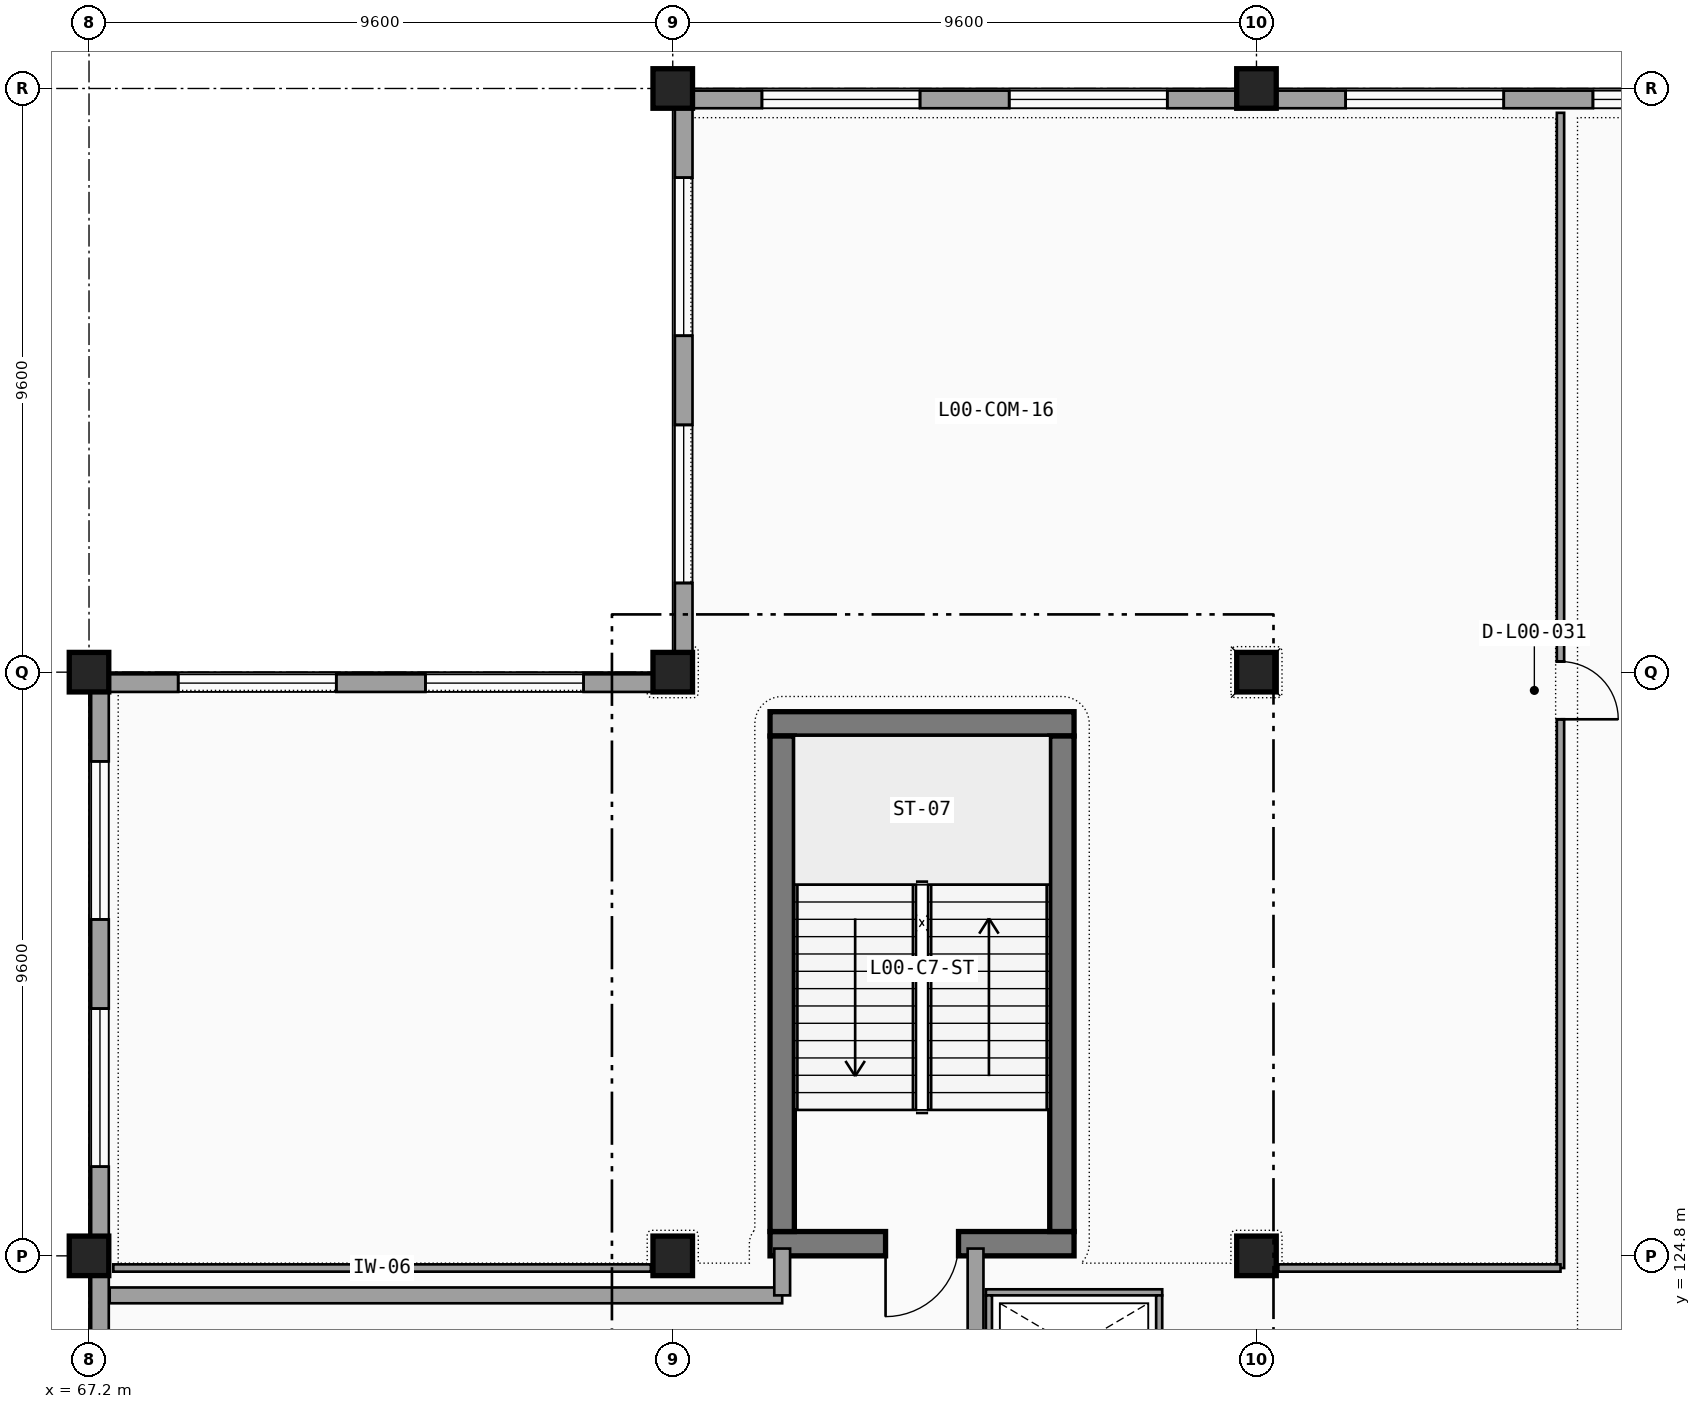
"""IFC4 building model, lengths in metres.
Left out: names, types, materials, properties, quantities, classifications, styles, units other than length and angle.
Written with IfcOpenShell. Run it as: python <this file> out.ifc"""

import sys

from ifc_helpers import new_model, si_unit, direction, frame, frame_2d, origin, origin_2d, place, context, subcontext, project, spatial, rectangle, extrude, element, fill, save


model = new_model("IFC4")
c1 = context("Model", 3, precision=1e-05, world=origin(), true_north=direction((0.0, 1.0)))
c2 = subcontext(c1, "Body", "Model", "MODEL_VIEW")
j1 = project(units=[si_unit("LENGTHUNIT", "METRE"), si_unit("PLANEANGLEUNIT", "RADIAN")], contexts=[c1])
p1 = place(None, origin())
s1 = spatial("IfcSite", under=j1, at=p1, CompositionType="ELEMENT")
p2 = place(p1, origin())
s2 = spatial("IfcBuilding", under=s1, at=p2, CompositionType="ELEMENT")
p3 = place(p2, origin())
s3 = spatial("IfcBuildingStorey", under=s2, at=p3, CompositionType="ELEMENT", Elevation=0.0)
for number, where, z_axis, x_axis in (
    (1, (67.2, 124.8, 0.0), (0.0, 0.0, 1.0), (1.0, 0.0, 0.0)),
    (2, (67.2, 134.4, 0.0), (0.0, 0.0, 1.0), (1.0, 0.0, 0.0)),
    (3, (76.8, 124.8, 0.0), (0.0, 0.0, 1.0), (1.0, 0.0, 0.0)),
    (4, (76.8, 134.4, 0.0), (0.0, 0.0, 1.0), (1.0, 0.0, 0.0)),
    (5, (76.8, 144.0, 0.0), (0.0, 0.0, 1.0), (1.0, 0.0, 0.0)),
    (6, (86.4, 124.8, 0.0), (0.0, 0.0, 1.0), (1.0, 0.0, 0.0)),
    (7, (86.4, 134.4, 0.0), (0.0, 0.0, 1.0), (1.0, 0.0, 0.0)),
    (8, (86.4, 144.0, 0.0), (0.0, 0.0, 1.0), (1.0, 0.0, 0.0)),
):
    element("IfcColumn", number, at=place(p3, frame(where, z_axis=z_axis, x_axis=x_axis)), inside=s3, PredefinedType="COLUMN", context=c2, shape_type="SweptSolid", body=[
        extrude(rectangle(XDim=0.65, YDim=0.65, at=origin_2d()), origin(), (0.0, 0.0, 1.0), 4.8),
    ])
p4 = place(p3, frame((96.0, 143.82, 0.0), z_axis=(0.0, 0.0, 1.0), x_axis=(-1.0, 0.0, 0.0)))
e9 = element("IfcWall", 9, at=p4, inside=s3, PredefinedType="SOLIDWALL", context=c2, shape_type="SweptSolid", body=[
    extrude(rectangle(XDim=9.6, YDim=0.29, at=frame_2d((4.8, 0.0))), origin(), (0.0, 0.0, 1.0), 3.573),
])
p5 = place(p4, frame((4.067, 0.0, 1.0), z_axis=(0.0, 0.0, 1.0), x_axis=(-1.0, 0.0, 0.0)))
e10 = element("IfcOpeningElement", 10, at=p5, cuts=e9, PredefinedType="OPENING", context=c2, shape_type="SweptSolid", body=[
    extrude(rectangle(XDim=2.6, YDim=2.0, at=frame_2d((1.3, 1.0))), frame((0.0, 0.155, 0.0), z_axis=(0.0, -1.0, 0.0), x_axis=(1.0, 0.0, 0.0)), (0.0, 0.0, 1.0), 0.31),
])
p6 = place(p4, frame((8.133, 0.0, 1.0), z_axis=(0.0, 0.0, 1.0), x_axis=(-1.0, 0.0, 0.0)))
e11 = element("IfcOpeningElement", 11, at=p6, cuts=e9, PredefinedType="OPENING", context=c2, shape_type="SweptSolid", body=[
    extrude(rectangle(XDim=2.6, YDim=2.0, at=frame_2d((1.3, 1.0))), frame((0.0, 0.155, 0.0), z_axis=(0.0, -1.0, 0.0), x_axis=(1.0, 0.0, 0.0)), (0.0, 0.0, 1.0), 0.31),
])
p7 = place(p3, frame((86.4, 143.82, 0.0), z_axis=(0.0, 0.0, 1.0), x_axis=(-1.0, 0.0, 0.0)))
e12 = element("IfcWall", 12, at=p7, inside=s3, PredefinedType="SOLIDWALL", context=c2, shape_type="SweptSolid", body=[
    extrude(rectangle(XDim=9.6, YDim=0.29, at=frame_2d((4.8, 0.0))), origin(), (0.0, 0.0, 1.0), 3.573),
])
p8 = place(p7, frame((4.067, 0.0, 1.0), z_axis=(0.0, 0.0, 1.0), x_axis=(-1.0, 0.0, 0.0)))
e13 = element("IfcOpeningElement", 13, at=p8, cuts=e12, PredefinedType="OPENING", context=c2, shape_type="SweptSolid", body=[
    extrude(rectangle(XDim=2.6, YDim=2.0, at=frame_2d((1.3, 1.0))), frame((0.0, 0.155, 0.0), z_axis=(0.0, -1.0, 0.0), x_axis=(1.0, 0.0, 0.0)), (0.0, 0.0, 1.0), 0.31),
])
p9 = place(p7, frame((8.133, 0.0, 1.0), z_axis=(0.0, 0.0, 1.0), x_axis=(-1.0, 0.0, 0.0)))
e14 = element("IfcOpeningElement", 14, at=p9, cuts=e12, PredefinedType="OPENING", context=c2, shape_type="SweptSolid", body=[
    extrude(rectangle(XDim=2.6, YDim=2.0, at=frame_2d((1.3, 1.0))), frame((0.0, 0.155, 0.0), z_axis=(0.0, -1.0, 0.0), x_axis=(1.0, 0.0, 0.0)), (0.0, 0.0, 1.0), 0.31),
])
p10 = place(p3, frame((76.98, 144.0, 0.0), z_axis=(0.0, 0.0, 1.0), x_axis=(0.0, -1.0, 0.0)))
e15 = element("IfcWall", 15, at=p10, inside=s3, PredefinedType="SOLIDWALL", context=c2, shape_type="SweptSolid", body=[
    extrude(rectangle(XDim=9.6, YDim=0.29, at=frame_2d((4.8, 0.0))), origin(), (0.0, 0.0, 1.0), 3.7),
])
p11 = place(p10, frame((4.067, 0.0, 1.0), z_axis=(0.0, 0.0, 1.0), x_axis=(-1.0, 0.0, 0.0)))
e16 = element("IfcOpeningElement", 16, at=p11, cuts=e15, PredefinedType="OPENING", context=c2, shape_type="SweptSolid", body=[
    extrude(rectangle(XDim=2.6, YDim=2.0, at=frame_2d((1.3, 1.0))), frame((0.0, 0.155, 0.0), z_axis=(0.0, -1.0, 0.0), x_axis=(1.0, 0.0, 0.0)), (0.0, 0.0, 1.0), 0.31),
])
p12 = place(p10, frame((8.133, 0.0, 1.0), z_axis=(0.0, 0.0, 1.0), x_axis=(-1.0, 0.0, 0.0)))
e17 = element("IfcOpeningElement", 17, at=p12, cuts=e15, PredefinedType="OPENING", context=c2, shape_type="SweptSolid", body=[
    extrude(rectangle(XDim=2.6, YDim=2.0, at=frame_2d((1.3, 1.0))), frame((0.0, 0.155, 0.0), z_axis=(0.0, -1.0, 0.0), x_axis=(1.0, 0.0, 0.0)), (0.0, 0.0, 1.0), 0.31),
])
p13 = place(p3, frame((76.8, 134.22, 0.0), z_axis=(0.0, 0.0, 1.0), x_axis=(-1.0, 0.0, 0.0)))
e18 = element("IfcWall", 18, at=p13, inside=s3, PredefinedType="SOLIDWALL", context=c2, shape_type="SweptSolid", body=[
    extrude(rectangle(XDim=9.6, YDim=0.29, at=frame_2d((4.8, 0.0))), origin(), (0.0, 0.0, 1.0), 3.664),
])
p14 = place(p13, frame((4.067, 0.0, 1.0), z_axis=(0.0, 0.0, 1.0), x_axis=(-1.0, 0.0, 0.0)))
e19 = element("IfcOpeningElement", 19, at=p14, cuts=e18, PredefinedType="OPENING", context=c2, shape_type="SweptSolid", body=[
    extrude(rectangle(XDim=2.6, YDim=2.0, at=frame_2d((1.3, 1.0))), frame((0.0, 0.155, 0.0), z_axis=(0.0, -1.0, 0.0), x_axis=(1.0, 0.0, 0.0)), (0.0, 0.0, 1.0), 0.31),
])
p15 = place(p13, frame((8.133, 0.0, 1.0), z_axis=(0.0, 0.0, 1.0), x_axis=(-1.0, 0.0, 0.0)))
e20 = element("IfcOpeningElement", 20, at=p15, cuts=e18, PredefinedType="OPENING", context=c2, shape_type="SweptSolid", body=[
    extrude(rectangle(XDim=2.6, YDim=2.0, at=frame_2d((1.3, 1.0))), frame((0.0, 0.155, 0.0), z_axis=(0.0, -1.0, 0.0), x_axis=(1.0, 0.0, 0.0)), (0.0, 0.0, 1.0), 0.31),
])
p16 = place(p3, frame((67.38, 134.4, 0.0), z_axis=(0.0, 0.0, 1.0), x_axis=(0.0, -1.0, 0.0)))
e21 = element("IfcWall", 21, at=p16, inside=s3, PredefinedType="SOLIDWALL", context=c2, shape_type="SweptSolid", body=[
    extrude(rectangle(XDim=9.6, YDim=0.29, at=frame_2d((4.8, 0.0))), origin(), (0.0, 0.0, 1.0), 3.7),
])
p17 = place(p16, frame((4.067, 0.0, 1.0), z_axis=(0.0, 0.0, 1.0), x_axis=(-1.0, 0.0, 0.0)))
e22 = element("IfcOpeningElement", 22, at=p17, cuts=e21, PredefinedType="OPENING", context=c2, shape_type="SweptSolid", body=[
    extrude(rectangle(XDim=2.6, YDim=2.0, at=frame_2d((1.3, 1.0))), frame((0.0, 0.155, 0.0), z_axis=(0.0, -1.0, 0.0), x_axis=(1.0, 0.0, 0.0)), (0.0, 0.0, 1.0), 0.31),
])
p18 = place(p16, frame((8.133, 0.0, 1.0), z_axis=(0.0, 0.0, 1.0), x_axis=(-1.0, 0.0, 0.0)))
e23 = element("IfcOpeningElement", 23, at=p18, cuts=e21, PredefinedType="OPENING", context=c2, shape_type="SweptSolid", body=[
    extrude(rectangle(XDim=2.6, YDim=2.0, at=frame_2d((1.3, 1.0))), frame((0.0, 0.155, 0.0), z_axis=(0.0, -1.0, 0.0), x_axis=(1.0, 0.0, 0.0)), (0.0, 0.0, 1.0), 0.31),
])
p19 = place(p3, frame((67.38, 124.8, 0.0), z_axis=(0.0, 0.0, 1.0), x_axis=(0.0, -1.0, 0.0)))
e24 = element("IfcWall", 24, at=p19, inside=s3, PredefinedType="SOLIDWALL", context=c2, shape_type="SweptSolid", body=[
    extrude(rectangle(XDim=9.6, YDim=0.29, at=frame_2d((4.8, 0.0))), origin(), (0.0, 0.0, 1.0), 3.7),
])
p20 = place(p19, frame((3.35, 0.0, 0.0), z_axis=(0.0, 0.0, 1.0), x_axis=(-1.0, 0.0, 0.0)))
e25 = element("IfcOpeningElement", 25, at=p20, cuts=e24, PredefinedType="OPENING", context=c2, shape_type="SweptSolid", body=[
    extrude(rectangle(XDim=2.0, YDim=2.4, at=frame_2d((1.0, 1.2))), frame((0.0, 0.155, 0.0), z_axis=(0.0, -1.0, 0.0), x_axis=(1.0, 0.0, 0.0)), (0.0, 0.0, 1.0), 0.31),
])
p21 = place(p3, frame((78.4, 125.0, 0.0), z_axis=(0.0, 0.0, 1.0), x_axis=(1.0, 0.0, 0.0)))
e26 = element("IfcWall", 26, at=p21, inside=s3, PredefinedType="SHEAR", context=c2, shape_type="SweptSolid", body=[
    extrude(rectangle(XDim=5.0, YDim=0.4, at=frame_2d((2.5, 0.0))), origin(), (0.0, 0.0, 1.0), 4.5),
])
p22 = place(p21, frame((3.1, 0.0, 0.0), z_axis=(0.0, 0.0, 1.0), x_axis=(-1.0, 0.0, 0.0)))
e27 = element("IfcOpeningElement", 27, at=p22, cuts=e26, PredefinedType="OPENING", context=c2, shape_type="SweptSolid", body=[
    extrude(rectangle(XDim=1.2, YDim=2.2, at=frame_2d((0.6, 1.1))), frame((0.0, 0.21, 0.0), z_axis=(0.0, -1.0, 0.0), x_axis=(1.0, 0.0, 0.0)), (0.0, 0.0, 1.0), 0.42),
])
p23 = place(p3, frame((83.4, 133.55, 0.0), z_axis=(0.0, 0.0, 1.0), x_axis=(-1.0, 0.0, 0.0)))
e28 = element("IfcWall", 28, at=p23, inside=s3, PredefinedType="SHEAR", context=c2, shape_type="SweptSolid", body=[
    extrude(rectangle(XDim=5.0, YDim=0.4, at=frame_2d((2.5, 0.0))), origin(), (0.0, 0.0, 1.0), 4.5),
])
for number, where, z_axis, x_axis in (
    (29, (78.6, 133.35, 0.0), (0.0, 0.0, 1.0), (0.0, -1.0, 0.0)),
    (30, (83.2, 125.2, 0.0), (0.0, 0.0, 1.0), (0.0, 1.0, 0.0)),
):
    element("IfcWall", number, at=place(p3, frame(where, z_axis=z_axis, x_axis=x_axis)), inside=s3, PredefinedType="SHEAR", context=c2, shape_type="SweptSolid", body=[
        extrude(rectangle(XDim=8.15, YDim=0.4, at=frame_2d((4.075, 0.0))), origin(), (0.0, 0.0, 1.0), 4.5),
    ])
p24 = place(p3, frame((84.85, 124.2, 0.0), z_axis=(0.0, 0.0, 1.0), x_axis=(-1.0, 0.0, 0.0)))
e31 = element("IfcWall", 31, at=p24, inside=s3, PredefinedType="PARTITIONING", context=c2, shape_type="SweptSolid", body=[
    extrude(rectangle(XDim=2.9, YDim=0.1, at=frame_2d((1.45, 0.0))), origin(), (0.0, 0.0, 1.0), 4.5),
])
for number, where, z_axis, x_axis in (
    (32, (82.0, 124.15, 0.0), (0.0, 0.0, 1.0), (0.0, -1.0, 0.0)),
    (33, (84.8, 122.45, 0.0), (0.0, 0.0, 1.0), (0.0, 1.0, 0.0)),
):
    element("IfcWall", number, at=place(p3, frame(where, z_axis=z_axis, x_axis=x_axis)), inside=s3, PredefinedType="PARTITIONING", context=c2, shape_type="SweptSolid", body=[
        extrude(rectangle(XDim=1.7, YDim=0.1, at=frame_2d((0.85, 0.0))), origin(), (0.0, 0.0, 1.0), 4.5),
    ])
p25 = place(p3, frame((67.54, 124.15, 0.0), z_axis=(0.0, 0.0, 1.0), x_axis=(1.0, 0.0, 0.0)))
e34 = element("IfcWall", 34, at=p25, inside=s3, PredefinedType="SOLIDWALL", context=c2, shape_type="SweptSolid", body=[
    extrude(rectangle(XDim=11.06, YDim=0.26, at=frame_2d((5.53, 0.0))), origin(), (0.0, 0.0, 1.0), 3.7),
])
p26 = place(p3, frame((78.6, 124.15, 0.0), z_axis=(0.0, 0.0, 1.0), x_axis=(0.0, 1.0, 0.0)))
e35 = element("IfcWall", 35, at=p26, inside=s3, PredefinedType="SOLIDWALL", context=c2, shape_type="SweptSolid", body=[
    extrude(rectangle(XDim=0.77, YDim=0.26, at=frame_2d((0.385, 0.0))), origin(), (0.0, 0.0, 1.0), 3.664),
])
p27 = place(p3, frame((81.78, 122.48, 0.0), z_axis=(0.0, 0.0, 1.0), x_axis=(0.0, 1.0, 0.0)))
e36 = element("IfcWall", 36, at=p27, inside=s3, PredefinedType="SOLIDWALL", context=c2, shape_type="SweptSolid", body=[
    extrude(rectangle(XDim=2.44, YDim=0.26, at=frame_2d((1.22, 0.0))), origin(), (0.0, 0.0, 1.0), 3.664),
])
p28 = place(p3, frame((76.44, 124.6, 0.0), z_axis=(0.0, 0.0, 1.0), x_axis=(-1.0, 0.0, 0.0)))
e37 = element("IfcWall", 37, at=p28, inside=s3, PredefinedType="PARTITIONING", context=c2, shape_type="SweptSolid", body=[
    extrude(rectangle(XDim=8.84, YDim=0.12, at=frame_2d((4.42, 0.0))), origin(), (0.0, 0.0, 1.0), 3.664),
])
p29 = place(p3, frame((91.4, 143.6, 0.0), z_axis=(0.0, 0.0, 1.0), x_axis=(0.0, -1.0, 0.0)))
e38 = element("IfcWall", 38, at=p29, inside=s3, PredefinedType="PARTITIONING", context=c2, shape_type="SweptSolid", body=[
    extrude(rectangle(XDim=19.0, YDim=0.12, at=frame_2d((9.5, 0.0))), origin(), (0.0, 0.0, 1.0), 3.664),
])
p30 = place(p29, frame((9.025, 0.0, 0.0), z_axis=(0.0, 0.0, 1.0), x_axis=(1.0, 0.0, 0.0)))
e39 = element("IfcOpeningElement", 39, at=p30, cuts=e38, PredefinedType="OPENING", context=c2, shape_type="SweptSolid", body=[
    extrude(rectangle(XDim=0.95, YDim=2.15, at=frame_2d((0.475, 1.075))), frame((0.0, 0.07, 0.0), z_axis=(0.0, -1.0, 0.0), x_axis=(1.0, 0.0, 0.0)), (0.0, 0.0, 1.0), 0.14),
])
p31 = place(p3, frame((91.4, 124.6, 0.0), z_axis=(0.0, 0.0, 1.0), x_axis=(-1.0, 0.0, 0.0)))
e40 = element("IfcWall", 40, at=p31, inside=s3, PredefinedType="PARTITIONING", context=c2, shape_type="SweptSolid", body=[
    extrude(rectangle(XDim=4.64, YDim=0.12, at=frame_2d((2.32, 0.0))), origin(), (0.0, 0.0, 1.0), 3.664),
])
p32 = place(p5, origin())
e41 = element("IfcWindow", 41, at=p32, inside=s3, PartitioningType="SINGLE_PANEL", PredefinedType="WINDOW", context=c2, shape_type="SweptSolid", body=[
    extrude(rectangle(XDim=2.6, YDim=2.0, at=frame_2d((1.3, 1.0))), frame((0.0, 0.03, 0.0), z_axis=(0.0, -1.0, 0.0), x_axis=(1.0, 0.0, 0.0)), (0.0, 0.0, 1.0), 0.06),
])
fill(e10, e41)
p33 = place(p6, origin())
e42 = element("IfcWindow", 42, at=p33, inside=s3, PartitioningType="SINGLE_PANEL", PredefinedType="WINDOW", context=c2, shape_type="SweptSolid", body=[
    extrude(rectangle(XDim=2.6, YDim=2.0, at=frame_2d((1.3, 1.0))), frame((0.0, 0.03, 0.0), z_axis=(0.0, -1.0, 0.0), x_axis=(1.0, 0.0, 0.0)), (0.0, 0.0, 1.0), 0.06),
])
fill(e11, e42)
p34 = place(p8, origin())
e43 = element("IfcWindow", 43, at=p34, inside=s3, PartitioningType="SINGLE_PANEL", PredefinedType="WINDOW", context=c2, shape_type="SweptSolid", body=[
    extrude(rectangle(XDim=2.6, YDim=2.0, at=frame_2d((1.3, 1.0))), frame((0.0, 0.03, 0.0), z_axis=(0.0, -1.0, 0.0), x_axis=(1.0, 0.0, 0.0)), (0.0, 0.0, 1.0), 0.06),
])
fill(e13, e43)
p35 = place(p9, origin())
e44 = element("IfcWindow", 44, at=p35, inside=s3, PartitioningType="SINGLE_PANEL", PredefinedType="WINDOW", context=c2, shape_type="SweptSolid", body=[
    extrude(rectangle(XDim=2.6, YDim=2.0, at=frame_2d((1.3, 1.0))), frame((0.0, 0.03, 0.0), z_axis=(0.0, -1.0, 0.0), x_axis=(1.0, 0.0, 0.0)), (0.0, 0.0, 1.0), 0.06),
])
fill(e14, e44)
p36 = place(p11, origin())
e45 = element("IfcWindow", 45, at=p36, inside=s3, PartitioningType="SINGLE_PANEL", PredefinedType="WINDOW", context=c2, shape_type="SweptSolid", body=[
    extrude(rectangle(XDim=2.6, YDim=2.0, at=frame_2d((1.3, 1.0))), frame((0.0, 0.03, 0.0), z_axis=(0.0, -1.0, 0.0), x_axis=(1.0, 0.0, 0.0)), (0.0, 0.0, 1.0), 0.06),
])
fill(e16, e45)
p37 = place(p12, origin())
e46 = element("IfcWindow", 46, at=p37, inside=s3, PartitioningType="SINGLE_PANEL", PredefinedType="WINDOW", context=c2, shape_type="SweptSolid", body=[
    extrude(rectangle(XDim=2.6, YDim=2.0, at=frame_2d((1.3, 1.0))), frame((0.0, 0.03, 0.0), z_axis=(0.0, -1.0, 0.0), x_axis=(1.0, 0.0, 0.0)), (0.0, 0.0, 1.0), 0.06),
])
fill(e17, e46)
p38 = place(p14, origin())
e47 = element("IfcWindow", 47, at=p38, inside=s3, PartitioningType="SINGLE_PANEL", PredefinedType="WINDOW", context=c2, shape_type="SweptSolid", body=[
    extrude(rectangle(XDim=2.6, YDim=2.0, at=frame_2d((1.3, 1.0))), frame((0.0, 0.03, 0.0), z_axis=(0.0, -1.0, 0.0), x_axis=(1.0, 0.0, 0.0)), (0.0, 0.0, 1.0), 0.06),
])
fill(e19, e47)
p39 = place(p15, origin())
e48 = element("IfcWindow", 48, at=p39, inside=s3, PartitioningType="SINGLE_PANEL", PredefinedType="WINDOW", context=c2, shape_type="SweptSolid", body=[
    extrude(rectangle(XDim=2.6, YDim=2.0, at=frame_2d((1.3, 1.0))), frame((0.0, 0.03, 0.0), z_axis=(0.0, -1.0, 0.0), x_axis=(1.0, 0.0, 0.0)), (0.0, 0.0, 1.0), 0.06),
])
fill(e20, e48)
p40 = place(p17, origin())
e49 = element("IfcWindow", 49, at=p40, inside=s3, PartitioningType="SINGLE_PANEL", PredefinedType="WINDOW", context=c2, shape_type="SweptSolid", body=[
    extrude(rectangle(XDim=2.6, YDim=2.0, at=frame_2d((1.3, 1.0))), frame((0.0, 0.03, 0.0), z_axis=(0.0, -1.0, 0.0), x_axis=(1.0, 0.0, 0.0)), (0.0, 0.0, 1.0), 0.06),
])
fill(e22, e49)
p41 = place(p18, origin())
e50 = element("IfcWindow", 50, at=p41, inside=s3, PartitioningType="SINGLE_PANEL", PredefinedType="WINDOW", context=c2, shape_type="SweptSolid", body=[
    extrude(rectangle(XDim=2.6, YDim=2.0, at=frame_2d((1.3, 1.0))), frame((0.0, 0.03, 0.0), z_axis=(0.0, -1.0, 0.0), x_axis=(1.0, 0.0, 0.0)), (0.0, 0.0, 1.0), 0.06),
])
fill(e23, e50)
p42 = place(p22, origin())
e51 = element("IfcDoor", 51, at=p42, inside=s3, OperationType="SINGLE_SWING_RIGHT", PredefinedType="DOOR", context=c2, shape_type="SweptSolid", body=[
    extrude(rectangle(XDim=1.2, YDim=2.2, at=frame_2d((0.6, 1.1))), frame((0.0, 0.025, 0.0), z_axis=(0.0, -1.0, 0.0), x_axis=(1.0, 0.0, 0.0)), (0.0, 0.0, 1.0), 0.05),
])
fill(e27, e51)
p43 = place(p30, origin())
e52 = element("IfcDoor", 52, at=p43, inside=s3, OperationType="SINGLE_SWING_RIGHT", PredefinedType="DOOR", context=c2, shape_type="SweptSolid", body=[
    extrude(rectangle(XDim=0.95, YDim=2.15, at=frame_2d((0.475, 1.075))), frame((0.0, 0.025, 0.0), z_axis=(0.0, -1.0, 0.0), x_axis=(1.0, 0.0, 0.0)), (0.0, 0.0, 1.0), 0.05),
])
fill(e39, e52)
save(model, sys.argv[1])
